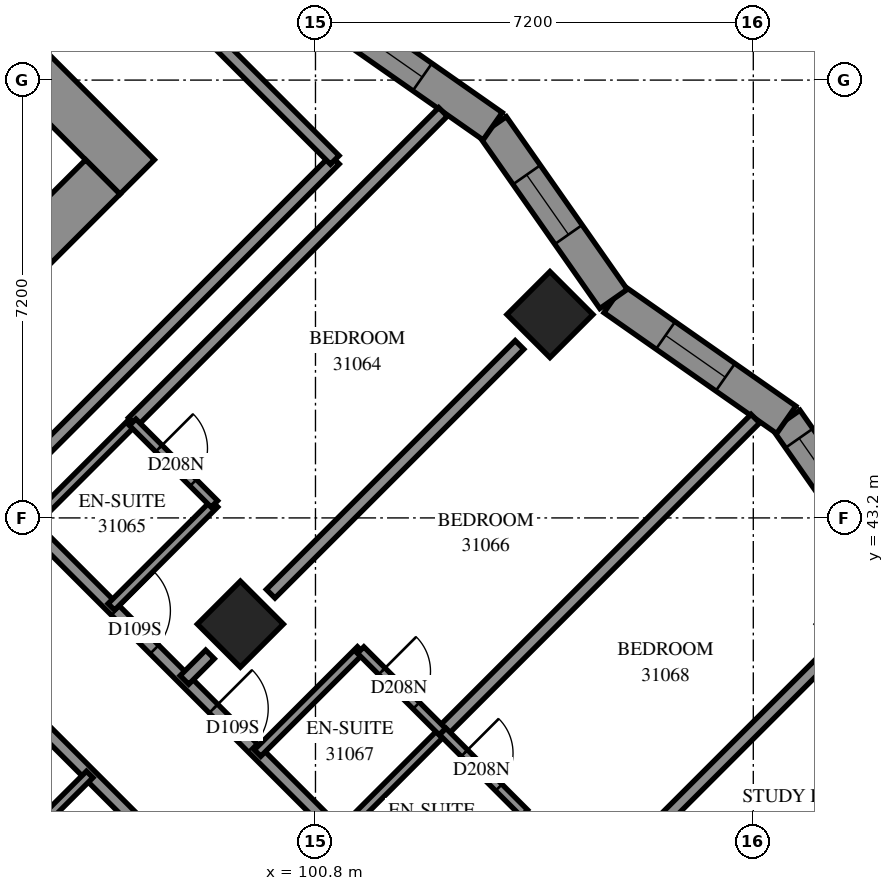
"""IFC4 building model, lengths in metres.
Left out: names, types, materials, properties, quantities, classifications, styles, units other than length and angle.
Written with IfcOpenShell. Run it as: python <this file> out.ifc"""

import sys

from ifc_helpers import new_model, si_unit, direction, frame, frame_2d, origin, origin_2d, place, context, subcontext, project, spatial, polyline, rectangle, outline, extrude, element, fill, save


model = new_model("IFC4")
c1 = context("Model", 3, precision=1e-05, world=origin(), true_north=direction((0.0, 1.0)))
c2 = subcontext(c1, "Body", "Model", "MODEL_VIEW")
j1 = project(units=[si_unit("LENGTHUNIT", "METRE"), si_unit("PLANEANGLEUNIT", "RADIAN")], contexts=[c1])
p1 = place(None, origin())
s1 = spatial("IfcSite", under=j1, at=p1, CompositionType="ELEMENT")
p2 = place(p1, origin())
s2 = spatial("IfcBuilding", under=s1, at=p2, CompositionType="ELEMENT")
p3 = place(p2, frame((0.0, 0.0, 115.2)))
s3 = spatial("IfcBuildingStorey", under=s2, at=p3, CompositionType="ELEMENT", Elevation=115.2)
for number, where, z_axis, x_axis in (
    (1, (104.656, 46.544, 0.0), (0.0, 0.0, 1.0), (0.707, -0.707, 0.0)),
    (2, (99.565, 41.453, 0.0), (0.0, 0.0, 1.0), (0.707, -0.707, 0.0)),
):
    element("IfcColumn", number, at=place(p3, frame(where, z_axis=z_axis, x_axis=x_axis)), inside=s3, PredefinedType="COLUMN", context=c2, shape_type="SweptSolid", body=[
        extrude(rectangle(XDim=1.0, YDim=1.0, at=origin_2d()), origin(), (0.0, 0.0, 1.0), 3.1),
    ])
p4 = place(p3, frame((86.554, 60.121, -0.3), z_axis=(0.0, 0.0, 1.0), x_axis=(0.7071067812, -0.7071067812, 0.0)))
e3 = element("IfcWall", 3, at=p4, inside=s3, PredefinedType="SHEAR", context=c2, shape_type="SweptSolid", body=[
    extrude(rectangle(XDim=16.0, YDim=0.8, at=frame_2d((8.0, 0.0))), origin(), (0.0, 0.0, 1.0), 2.7),
])
p5 = place(p4, frame((10.8, 0.0, 0.3)))
e4 = element("IfcOpeningElement", 4, at=p5, cuts=e3, PredefinedType="OPENING", context=c2, shape_type="SweptSolid", body=[
    extrude(rectangle(XDim=0.8, YDim=2.1, at=frame_2d((0.4, 1.05))), frame((0.0, 0.41, 0.0), z_axis=(0.0, -1.0, 0.0), x_axis=(1.0, 0.0, 0.0)), (0.0, 0.0, 1.0), 0.82),
])
p6 = place(p3, frame((87.12, 38.625, -0.3), z_axis=(0.0, 0.0, 1.0), x_axis=(0.7071067812, 0.7071067812, 0.0)))
e5 = element("IfcWall", 5, at=p6, inside=s3, PredefinedType="SHEAR", context=c2, shape_type="SweptSolid", body=[
    extrude(rectangle(XDim=14.4, YDim=0.8, at=frame_2d((7.2, 0.0))), origin(), (0.0, 0.0, 1.0), 2.7),
])
p7 = place(p6, frame((4.55, 0.0, 0.3)))
e6 = element("IfcOpeningElement", 6, at=p7, cuts=e5, PredefinedType="OPENING", context=c2, shape_type="SweptSolid", body=[
    extrude(rectangle(XDim=1.1, YDim=2.1, at=frame_2d((0.55, 1.05))), frame((0.0, 0.41, 0.0), z_axis=(0.0, -1.0, 0.0), x_axis=(1.0, 0.0, 0.0)), (0.0, 0.0, 1.0), 0.82),
])
p8 = place(p6, frame((11.35, 0.0, 0.3)))
e7 = element("IfcOpeningElement", 7, at=p8, cuts=e5, PredefinedType="OPENING", context=c2, shape_type="SweptSolid", body=[
    extrude(rectangle(XDim=1.1, YDim=2.1, at=frame_2d((0.55, 1.05))), frame((0.0, 0.41, 0.0), z_axis=(0.0, -1.0, 0.0), x_axis=(1.0, 0.0, 0.0)), (0.0, 0.0, 1.0), 0.82),
])
p9 = place(p3, frame((109.358, 36.362, 0.0), z_axis=(0.0, 0.0, 1.0), x_axis=(0.7071067812, 0.7071067812, 0.0)))
e8 = element("IfcWall", 8, at=p9, inside=s3, PredefinedType="SOLIDWALL", context=c2, shape_type="SweptSolid", body=[
    extrude(outline(polyline([(0.275, -0.275), (6.278, -0.275), (5.501, 0.275), (-0.275, 0.275), (0.275, -0.275)])), origin(), (0.0, 0.0, 1.0), 3.1),
])
p10 = place(p9, frame((1.137, 0.0, 0.6)))
e9 = element("IfcOpeningElement", 9, at=p10, cuts=e8, PredefinedType="OPENING", context=c2, shape_type="SweptSolid", body=[
    extrude(rectangle(XDim=1.8, YDim=1.9, at=frame_2d((0.9, 0.95))), frame((0.0, 0.285, 0.0), z_axis=(0.0, -1.0, 0.0), x_axis=(1.0, 0.0, 0.0)), (0.0, 0.0, 1.0), 0.57),
])
p11 = place(p9, frame((3.988, 0.0, 0.6)))
e10 = element("IfcOpeningElement", 10, at=p11, cuts=e8, PredefinedType="OPENING", context=c2, shape_type="SweptSolid", body=[
    extrude(rectangle(XDim=1.2, YDim=1.9, at=frame_2d((0.6, 0.95))), frame((0.0, 0.285, 0.0), z_axis=(0.0, -1.0, 0.0), x_axis=(1.0, 0.0, 0.0)), (0.0, 0.0, 1.0), 0.57),
])
p12 = place(p3, frame((110.543, 41.953, 0.0), z_axis=(0.0, 0.0, 1.0), x_axis=(-0.5733354333, 0.8193207436, 0.0)))
e11 = element("IfcWall", 11, at=p12, inside=s3, PredefinedType="SOLIDWALL", context=c2, shape_type="SweptSolid", body=[
    extrude(outline(polyline([(0.072, -0.275), (3.539, -0.275), (3.442, 0.275), (-0.072, 0.275), (0.072, -0.275)])), origin(), (0.0, 0.0, 1.0), 3.1),
])
p13 = place(p12, frame((0.321, 0.0, 0.5)))
e12 = element("IfcOpeningElement", 12, at=p13, cuts=e11, PredefinedType="OPENING", context=c2, shape_type="SweptSolid", body=[
    extrude(rectangle(XDim=1.3, YDim=2.45, at=frame_2d((0.65, 1.225))), frame((0.0, 0.285, 0.0), z_axis=(0.0, -1.0, 0.0), x_axis=(1.0, 0.0, 0.0)), (0.0, 0.0, 1.0), 0.57),
])
p14 = place(p12, frame((1.821, 0.0, 0.5)))
e13 = element("IfcOpeningElement", 13, at=p14, cuts=e11, PredefinedType="OPENING", context=c2, shape_type="SweptSolid", body=[
    extrude(rectangle(XDim=1.3, YDim=2.45, at=frame_2d((0.65, 1.225))), frame((0.0, 0.285, 0.0), z_axis=(0.0, -1.0, 0.0), x_axis=(1.0, 0.0, 0.0)), (0.0, 0.0, 1.0), 0.57),
])
p15 = place(p3, frame((108.542, 44.813, 0.0), z_axis=(0.0, 0.0, 1.0), x_axis=(-0.8193240603, 0.5733306936, 0.0)))
e14 = element("IfcWall", 14, at=p15, inside=s3, PredefinedType="SOLIDWALL", context=c2, shape_type="SweptSolid", body=[
    extrude(outline(polyline([(-0.049, -0.275), (3.418, -0.275), (3.515, 0.275), (0.049, 0.275), (-0.049, -0.275)])), origin(), (0.0, 0.0, 1.0), 3.1),
])
p16 = place(p15, frame((1.222, 0.0, 0.5)))
e15 = element("IfcOpeningElement", 15, at=p16, cuts=e14, PredefinedType="OPENING", context=c2, shape_type="SweptSolid", body=[
    extrude(rectangle(XDim=1.2, YDim=2.45, at=frame_2d((0.6, 1.225))), frame((0.0, 0.285, 0.0), z_axis=(0.0, -1.0, 0.0), x_axis=(1.0, 0.0, 0.0)), (0.0, 0.0, 1.0), 0.57),
])
p17 = place(p3, frame((105.702, 46.8, 0.0), z_axis=(0.0, 0.0, 1.0), x_axis=(-0.5733365071, 0.8193199922, 0.0)))
e16 = element("IfcWall", 16, at=p17, inside=s3, PredefinedType="SOLIDWALL", context=c2, shape_type="SweptSolid", body=[
    extrude(outline(polyline([(0.049, -0.275), (3.515, -0.275), (3.418, 0.275), (-0.049, 0.275), (0.049, -0.275)])), origin(), (0.0, 0.0, 1.0), 3.1),
])
p18 = place(p17, frame((1.292, 0.0, 0.5)))
e17 = element("IfcOpeningElement", 17, at=p18, cuts=e16, PredefinedType="OPENING", context=c2, shape_type="SweptSolid", body=[
    extrude(rectangle(XDim=1.2, YDim=2.45, at=frame_2d((0.6, 1.225))), frame((0.0, 0.285, 0.0), z_axis=(0.0, -1.0, 0.0), x_axis=(1.0, 0.0, 0.0)), (0.0, 0.0, 1.0), 0.57),
])
p19 = place(p3, frame((103.714, 49.641, 0.0), z_axis=(0.0, 0.0, 1.0), x_axis=(-0.8193240603, 0.5733306936, 0.0)))
e18 = element("IfcWall", 18, at=p19, inside=s3, PredefinedType="SOLIDWALL", context=c2, shape_type="SweptSolid", body=[
    extrude(outline(polyline([(-0.049, -0.275), (3.418, -0.275), (3.515, 0.275), (0.049, 0.275), (-0.049, -0.275)])), origin(), (0.0, 0.0, 1.0), 3.1),
])
p20 = place(p19, frame((1.411, 0.0, 0.5)))
e19 = element("IfcOpeningElement", 19, at=p20, cuts=e18, PredefinedType="OPENING", context=c2, shape_type="SweptSolid", body=[
    extrude(rectangle(XDim=1.2, YDim=2.45, at=frame_2d((0.6, 1.225))), frame((0.0, 0.285, 0.0), z_axis=(0.0, -1.0, 0.0), x_axis=(1.0, 0.0, 0.0)), (0.0, 0.0, 1.0), 0.57),
])
p21 = place(p3, frame((94.047, 42.015, 0.0), z_axis=(0.0, 0.0, 1.0), x_axis=(0.7071067812, -0.7071067812, 0.0)))
e20 = element("IfcWall", 20, at=p21, inside=s3, PredefinedType="PARTITIONING", context=c2, shape_type="SweptSolid", body=[
    extrude(rectangle(XDim=9.6, YDim=0.2, at=frame_2d((4.8, 0.0))), origin(), (0.0, 0.0, 1.0), 3.1),
])
p22 = place(p21, frame((1.099, 0.0, 0.0)))
e21 = element("IfcOpeningElement", 21, at=p22, cuts=e20, PredefinedType="OPENING", context=c2, shape_type="SweptSolid", body=[
    extrude(rectangle(XDim=0.9, YDim=2.1, at=frame_2d((0.45, 1.05))), frame((0.0, 0.11, 0.0), z_axis=(0.0, -1.0, 0.0), x_axis=(1.0, 0.0, 0.0)), (0.0, 0.0, 1.0), 0.22),
])
p23 = place(p21, frame((6.649, 0.0, 0.0)))
e22 = element("IfcOpeningElement", 22, at=p23, cuts=e20, PredefinedType="OPENING", context=c2, shape_type="SweptSolid", body=[
    extrude(rectangle(XDim=0.9, YDim=2.1, at=frame_2d((0.45, 1.05))), frame((0.0, 0.11, 0.0), z_axis=(0.0, -1.0, 0.0), x_axis=(1.0, 0.0, 0.0)), (0.0, 0.0, 1.0), 0.22),
])
p24 = place(p21, frame((8.3, 0.0, 0.0)))
e23 = element("IfcOpeningElement", 23, at=p24, cuts=e20, PredefinedType="OPENING", context=c2, shape_type="SweptSolid", body=[
    extrude(rectangle(XDim=0.9, YDim=2.1, at=frame_2d((0.45, 1.05))), frame((0.0, 0.11, 0.0), z_axis=(0.0, -1.0, 0.0), x_axis=(1.0, 0.0, 0.0)), (0.0, 0.0, 1.0), 0.22),
])
p25 = place(p3, frame((96.103, 43.083, 0.0), z_axis=(0.0, 0.0, 1.0), x_axis=(0.7071067812, -0.7071067812, 0.0)))
e24 = element("IfcWall", 24, at=p25, inside=s3, PredefinedType="PARTITIONING", context=c2, shape_type="SweptSolid", body=[
    extrude(rectangle(XDim=8.491, YDim=0.2, at=frame_2d((4.245, 0.0))), origin(), (0.0, 0.0, 1.0), 3.1),
])
p26 = place(p25, frame((1.995, 0.0, 0.0)))
e25 = element("IfcOpeningElement", 25, at=p26, cuts=e24, PredefinedType="OPENING", context=c2, shape_type="SweptSolid", body=[
    extrude(rectangle(XDim=0.9, YDim=2.1, at=frame_2d((0.45, 1.05))), frame((0.0, 0.11, 0.0), z_axis=(0.0, -1.0, 0.0), x_axis=(1.0, 0.0, 0.0)), (0.0, 0.0, 1.0), 0.22),
])
p27 = place(p25, frame((4.27, 0.0, 0.0)))
e26 = element("IfcOpeningElement", 26, at=p27, cuts=e24, PredefinedType="OPENING", context=c2, shape_type="SweptSolid", body=[
    extrude(rectangle(XDim=0.9, YDim=2.1, at=frame_2d((0.45, 1.05))), frame((0.0, 0.11, 0.0), z_axis=(0.0, -1.0, 0.0), x_axis=(1.0, 0.0, 0.0)), (0.0, 0.0, 1.0), 0.22),
])
p28 = place(p3, frame((95.606, 43.577, 0.0), z_axis=(0.0, 0.0, 1.0), x_axis=(0.7071067812, 0.7071067812, 0.0)))
e27 = element("IfcWall", 27, at=p28, inside=s3, PredefinedType="PARTITIONING", context=c2, shape_type="SweptSolid", body=[
    extrude(rectangle(XDim=7.798, YDim=0.2, at=frame_2d((3.899, 0.0))), origin(), (0.0, 0.0, 1.0), 3.1),
])
p29 = place(p3, frame((102.888, 39.686, 0.0), z_axis=(0.0, 0.0, 1.0), x_axis=(0.7071067812, 0.7071067812, 0.0)))
e28 = element("IfcWall", 28, at=p29, inside=s3, PredefinedType="PARTITIONING", context=c2, shape_type="SweptSolid", body=[
    extrude(rectangle(XDim=7.278, YDim=0.2, at=frame_2d((3.639, 0.0))), origin(), (0.0, 0.0, 1.0), 3.1),
])
p30 = place(p3, frame((97.795, 44.777, 0.0), z_axis=(0.0, 0.0, 1.0), x_axis=(0.707252317, 0.7069612154, 0.0)))
e29 = element("IfcWall", 29, at=p30, inside=s3, PredefinedType="PARTITIONING", context=c2, shape_type="SweptSolid", body=[
    extrude(rectangle(XDim=7.214, YDim=0.2, at=frame_2d((3.607, 0.0))), origin(), (0.0, 0.0, 1.0), 3.1),
])
for number, where, z_axis, x_axis in (
    (30, (105.155, 36.863, 0.0), (0.0, 0.0, 1.0), (0.707, 0.707, 0.0)),
    (31, (100.063, 41.953, 0.0), (0.0, 0.0, 1.0), (0.707, 0.707, 0.0)),
):
    element("IfcWall", number, at=place(p3, frame(where, z_axis=z_axis, x_axis=x_axis)), inside=s3, PredefinedType="PARTITIONING", context=c2, shape_type="SweptSolid", body=[
        extrude(rectangle(XDim=5.787, YDim=0.2, at=frame_2d((2.893, 0.0))), origin(), (0.0, 0.0, 1.0), 3.1),
    ])
p31 = place(p3, frame((94.047, 38.621, 0.0), z_axis=(0.0, 0.0, 1.0), x_axis=(0.7071067812, -0.7071067812, 0.0)))
e32 = element("IfcWall", 32, at=p31, inside=s3, PredefinedType="PARTITIONING", context=c2, shape_type="SweptSolid", body=[
    extrude(rectangle(XDim=3.799, YDim=0.15, at=frame_2d((1.899, 0.0))), origin(), (0.0, 0.0, 1.0), 3.1),
])
p32 = place(p31, frame((0.444, 0.0, 0.0)))
e33 = element("IfcOpeningElement", 33, at=p32, cuts=e32, PredefinedType="OPENING", context=c2, shape_type="SweptSolid", body=[
    extrude(rectangle(XDim=0.8, YDim=2.1, at=frame_2d((0.4, 1.05))), frame((0.0, 0.085, 0.0), z_axis=(0.0, -1.0, 0.0), x_axis=(1.0, 0.0, 0.0)), (0.0, 0.0, 1.0), 0.17),
])
p33 = place(p31, frame((2.551, 0.0, 0.0)))
e34 = element("IfcOpeningElement", 34, at=p33, cuts=e32, PredefinedType="OPENING", context=c2, shape_type="SweptSolid", body=[
    extrude(rectangle(XDim=0.8, YDim=2.1, at=frame_2d((0.4, 1.05))), frame((0.0, 0.085, 0.0), z_axis=(0.0, -1.0, 0.0), x_axis=(1.0, 0.0, 0.0)), (0.0, 0.0, 1.0), 0.17),
])
p34 = place(p3, frame((99.071, 51.133, 0.0), z_axis=(0.0, 0.0, 1.0), x_axis=(0.7071067812, -0.7071067812, 0.0)))
e35 = element("IfcWall", 35, at=p34, inside=s3, PredefinedType="PARTITIONING", context=c2, shape_type="SweptSolid", body=[
    extrude(rectangle(XDim=2.893, YDim=0.2, at=frame_2d((1.447, 0.0))), origin(), (0.0, 0.0, 1.0), 3.1),
])
p35 = place(p3, frame((102.533, 36.645, 0.0), z_axis=(0.0, 0.0, 1.0), x_axis=(0.7071067812, 0.7071067812, 0.0)))
e36 = element("IfcWall", 36, at=p35, inside=s3, PredefinedType="PARTITIONING", context=c2, shape_type="SweptSolid", body=[
    extrude(rectangle(XDim=2.401, YDim=0.15, at=frame_2d((1.201, 0.0))), origin(), (0.0, 0.0, 1.0), 3.1),
])
for number, where, z_axis, x_axis in (
    (37, (101.192, 37.988, 0.0), (0.0, 0.0, 1.0), (0.707, 0.708, 0.0)),
    (38, (95.389, 37.285, 0.0), (0.0, 0.0, 1.0), (0.708, 0.707, 0.0)),
):
    element("IfcWall", number, at=place(p3, frame(where, z_axis=z_axis, x_axis=x_axis)), inside=s3, PredefinedType="PARTITIONING", context=c2, shape_type="SweptSolid", body=[
        extrude(rectangle(XDim=2.4, YDim=0.15, at=frame_2d((1.2, 0.0))), origin(), (0.0, 0.0, 1.0), 3.1),
    ])
for number, where, z_axis, x_axis in (
    (39, (97.443, 41.737, 0.0), (0.0, 0.0, 1.0), (0.707, 0.707, 0.0)),
    (40, (96.099, 43.081, 0.0), (0.0, 0.0, 1.0), (0.707, 0.707, 0.0)),
    (41, (99.847, 39.333, 0.0), (0.0, 0.0, 1.0), (0.707, 0.707, 0.0)),
):
    element("IfcWall", number, at=place(p3, frame(where, z_axis=z_axis, x_axis=x_axis)), inside=s3, PredefinedType="PARTITIONING", context=c2, shape_type="SweptSolid", body=[
        extrude(rectangle(XDim=2.398, YDim=0.15, at=frame_2d((1.199, 0.0))), origin(), (0.0, 0.0, 1.0), 3.1),
    ])
p36 = place(p3, frame((97.793, 44.773, 0.0), z_axis=(0.0, 0.0, 1.0), x_axis=(0.7071067812, -0.7071067812, 0.0)))
e42 = element("IfcWall", 42, at=p36, inside=s3, PredefinedType="PARTITIONING", context=c2, shape_type="SweptSolid", body=[
    extrude(rectangle(XDim=1.901, YDim=0.15, at=frame_2d((0.95, 0.0))), origin(), (0.0, 0.0, 1.0), 3.1),
])
p37 = place(p36, frame((0.609, 0.0, 0.0)))
e43 = element("IfcOpeningElement", 43, at=p37, cuts=e42, PredefinedType="OPENING", context=c2, shape_type="SweptSolid", body=[
    extrude(rectangle(XDim=0.8, YDim=2.1, at=frame_2d((0.4, 1.05))), frame((0.0, 0.085, 0.0), z_axis=(0.0, -1.0, 0.0), x_axis=(1.0, 0.0, 0.0)), (0.0, 0.0, 1.0), 0.17),
])
p38 = place(p3, frame((102.891, 39.69, 0.0), z_axis=(0.0, 0.0, 1.0), x_axis=(0.7071067812, -0.7071067812, 0.0)))
e44 = element("IfcWall", 44, at=p38, inside=s3, PredefinedType="PARTITIONING", context=c2, shape_type="SweptSolid", body=[
    extrude(rectangle(XDim=1.901, YDim=0.15, at=frame_2d((0.95, 0.0))), origin(), (0.0, 0.0, 1.0), 3.1),
])
p39 = place(p38, frame((0.505, 0.0, 0.0)))
e45 = element("IfcOpeningElement", 45, at=p39, cuts=e44, PredefinedType="OPENING", context=c2, shape_type="SweptSolid", body=[
    extrude(rectangle(XDim=0.8, YDim=2.1, at=frame_2d((0.4, 1.05))), frame((0.0, 0.085, 0.0), z_axis=(0.0, -1.0, 0.0), x_axis=(1.0, 0.0, 0.0)), (0.0, 0.0, 1.0), 0.17),
])
p40 = place(p3, frame((101.543, 41.027, 0.0), z_axis=(0.0, 0.0, 1.0), x_axis=(0.7076330979, -0.7065800724, 0.0)))
e46 = element("IfcWall", 46, at=p40, inside=s3, PredefinedType="PARTITIONING", context=c2, shape_type="SweptSolid", body=[
    extrude(rectangle(XDim=1.899, YDim=0.15, at=frame_2d((0.95, 0.0))), origin(), (0.0, 0.0, 1.0), 3.1),
])
p41 = place(p40, frame((0.493, 0.0, 0.0)))
e47 = element("IfcOpeningElement", 47, at=p41, cuts=e46, PredefinedType="OPENING", context=c2, shape_type="SweptSolid", body=[
    extrude(rectangle(XDim=0.8, YDim=2.1, at=frame_2d((0.4, 1.05))), frame((0.0, 0.085, 0.0), z_axis=(0.0, -1.0, 0.0), x_axis=(1.0, 0.0, 0.0)), (0.0, 0.0, 1.0), 0.17),
])
p42 = place(p3, frame((98.645, 40.535, 0.0), z_axis=(0.0, 0.0, 1.0), x_axis=(0.7071067812, 0.7071067812, 0.0)))
e48 = element("IfcWall", 48, at=p42, inside=s3, PredefinedType="PARTITIONING", context=c2, shape_type="SweptSolid", body=[
    extrude(rectangle(XDim=0.594, YDim=0.2, at=frame_2d((0.297, 0.0))), origin(), (0.0, 0.0, 1.0), 3.1),
])
p43 = place(p14, origin())
e49 = element("IfcWindow", 49, at=p43, inside=s3, PartitioningType="SINGLE_PANEL", PredefinedType="WINDOW", context=c2, shape_type="SweptSolid", body=[
    extrude(rectangle(XDim=1.3, YDim=2.45, at=frame_2d((0.65, 1.225))), frame((0.0, 0.155, 0.0), z_axis=(0.0, -1.0, 0.0), x_axis=(1.0, 0.0, 0.0)), (0.0, 0.0, 1.0), 0.06),
])
fill(e13, e49)
p44 = place(p16, origin())
e50 = element("IfcWindow", 50, at=p44, inside=s3, PartitioningType="SINGLE_PANEL", PredefinedType="WINDOW", context=c2, shape_type="SweptSolid", body=[
    extrude(rectangle(XDim=1.2, YDim=2.45, at=frame_2d((0.6, 1.225))), frame((0.0, 0.155, 0.0), z_axis=(0.0, -1.0, 0.0), x_axis=(1.0, 0.0, 0.0)), (0.0, 0.0, 1.0), 0.06),
])
fill(e15, e50)
p45 = place(p18, origin())
e51 = element("IfcWindow", 51, at=p45, inside=s3, PartitioningType="SINGLE_PANEL", PredefinedType="WINDOW", context=c2, shape_type="SweptSolid", body=[
    extrude(rectangle(XDim=1.2, YDim=2.45, at=frame_2d((0.6, 1.225))), frame((0.0, 0.155, 0.0), z_axis=(0.0, -1.0, 0.0), x_axis=(1.0, 0.0, 0.0)), (0.0, 0.0, 1.0), 0.06),
])
fill(e17, e51)
p46 = place(p20, origin())
e52 = element("IfcWindow", 52, at=p46, inside=s3, PartitioningType="SINGLE_PANEL", PredefinedType="WINDOW", context=c2, shape_type="SweptSolid", body=[
    extrude(rectangle(XDim=1.2, YDim=2.45, at=frame_2d((0.6, 1.225))), frame((0.0, 0.155, 0.0), z_axis=(0.0, -1.0, 0.0), x_axis=(1.0, 0.0, 0.0)), (0.0, 0.0, 1.0), 0.06),
])
fill(e19, e52)
p47 = place(p26, origin())
e53 = element("IfcDoor", 53, at=p47, inside=s3, OperationType="SINGLE_SWING_RIGHT", PredefinedType="DOOR", context=c2, shape_type="SweptSolid", body=[
    extrude(rectangle(XDim=0.9, YDim=2.1, at=frame_2d((0.45, 1.05))), frame((0.0, 0.025, 0.0), z_axis=(0.0, -1.0, 0.0), x_axis=(1.0, 0.0, 0.0)), (0.0, 0.0, 1.0), 0.05),
])
fill(e25, e53)
p48 = place(p37, origin())
e54 = element("IfcDoor", 54, at=p48, inside=s3, OperationType="SINGLE_SWING_RIGHT", PredefinedType="DOOR", context=c2, shape_type="SweptSolid", body=[
    extrude(rectangle(XDim=0.8, YDim=2.1, at=frame_2d((0.4, 1.05))), frame((0.0, 0.025, 0.0), z_axis=(0.0, -1.0, 0.0), x_axis=(1.0, 0.0, 0.0)), (0.0, 0.0, 1.0), 0.05),
])
fill(e43, e54)
p49 = place(p27, origin())
e55 = element("IfcDoor", 55, at=p49, inside=s3, OperationType="SINGLE_SWING_LEFT", PredefinedType="DOOR", context=c2, shape_type="SweptSolid", body=[
    extrude(rectangle(XDim=0.9, YDim=2.1, at=frame_2d((0.45, 1.05))), frame((0.0, 0.025, 0.0), z_axis=(0.0, -1.0, 0.0), x_axis=(1.0, 0.0, 0.0)), (0.0, 0.0, 1.0), 0.05),
])
fill(e26, e55)
p50 = place(p41, origin())
e56 = element("IfcDoor", 56, at=p50, inside=s3, OperationType="SINGLE_SWING_RIGHT", PredefinedType="DOOR", context=c2, shape_type="SweptSolid", body=[
    extrude(rectangle(XDim=0.8, YDim=2.1, at=frame_2d((0.4, 1.05))), frame((0.0, 0.025, 0.0), z_axis=(0.0, -1.0, 0.0), x_axis=(1.0, 0.0, 0.0)), (0.0, 0.0, 1.0), 0.05),
])
fill(e47, e56)
p51 = place(p39, origin())
e57 = element("IfcDoor", 57, at=p51, inside=s3, OperationType="SINGLE_SWING_RIGHT", PredefinedType="DOOR", context=c2, shape_type="SweptSolid", body=[
    extrude(rectangle(XDim=0.8, YDim=2.1, at=frame_2d((0.4, 1.05))), frame((0.0, 0.025, 0.0), z_axis=(0.0, -1.0, 0.0), x_axis=(1.0, 0.0, 0.0)), (0.0, 0.0, 1.0), 0.05),
])
fill(e45, e57)
save(model, sys.argv[1])
